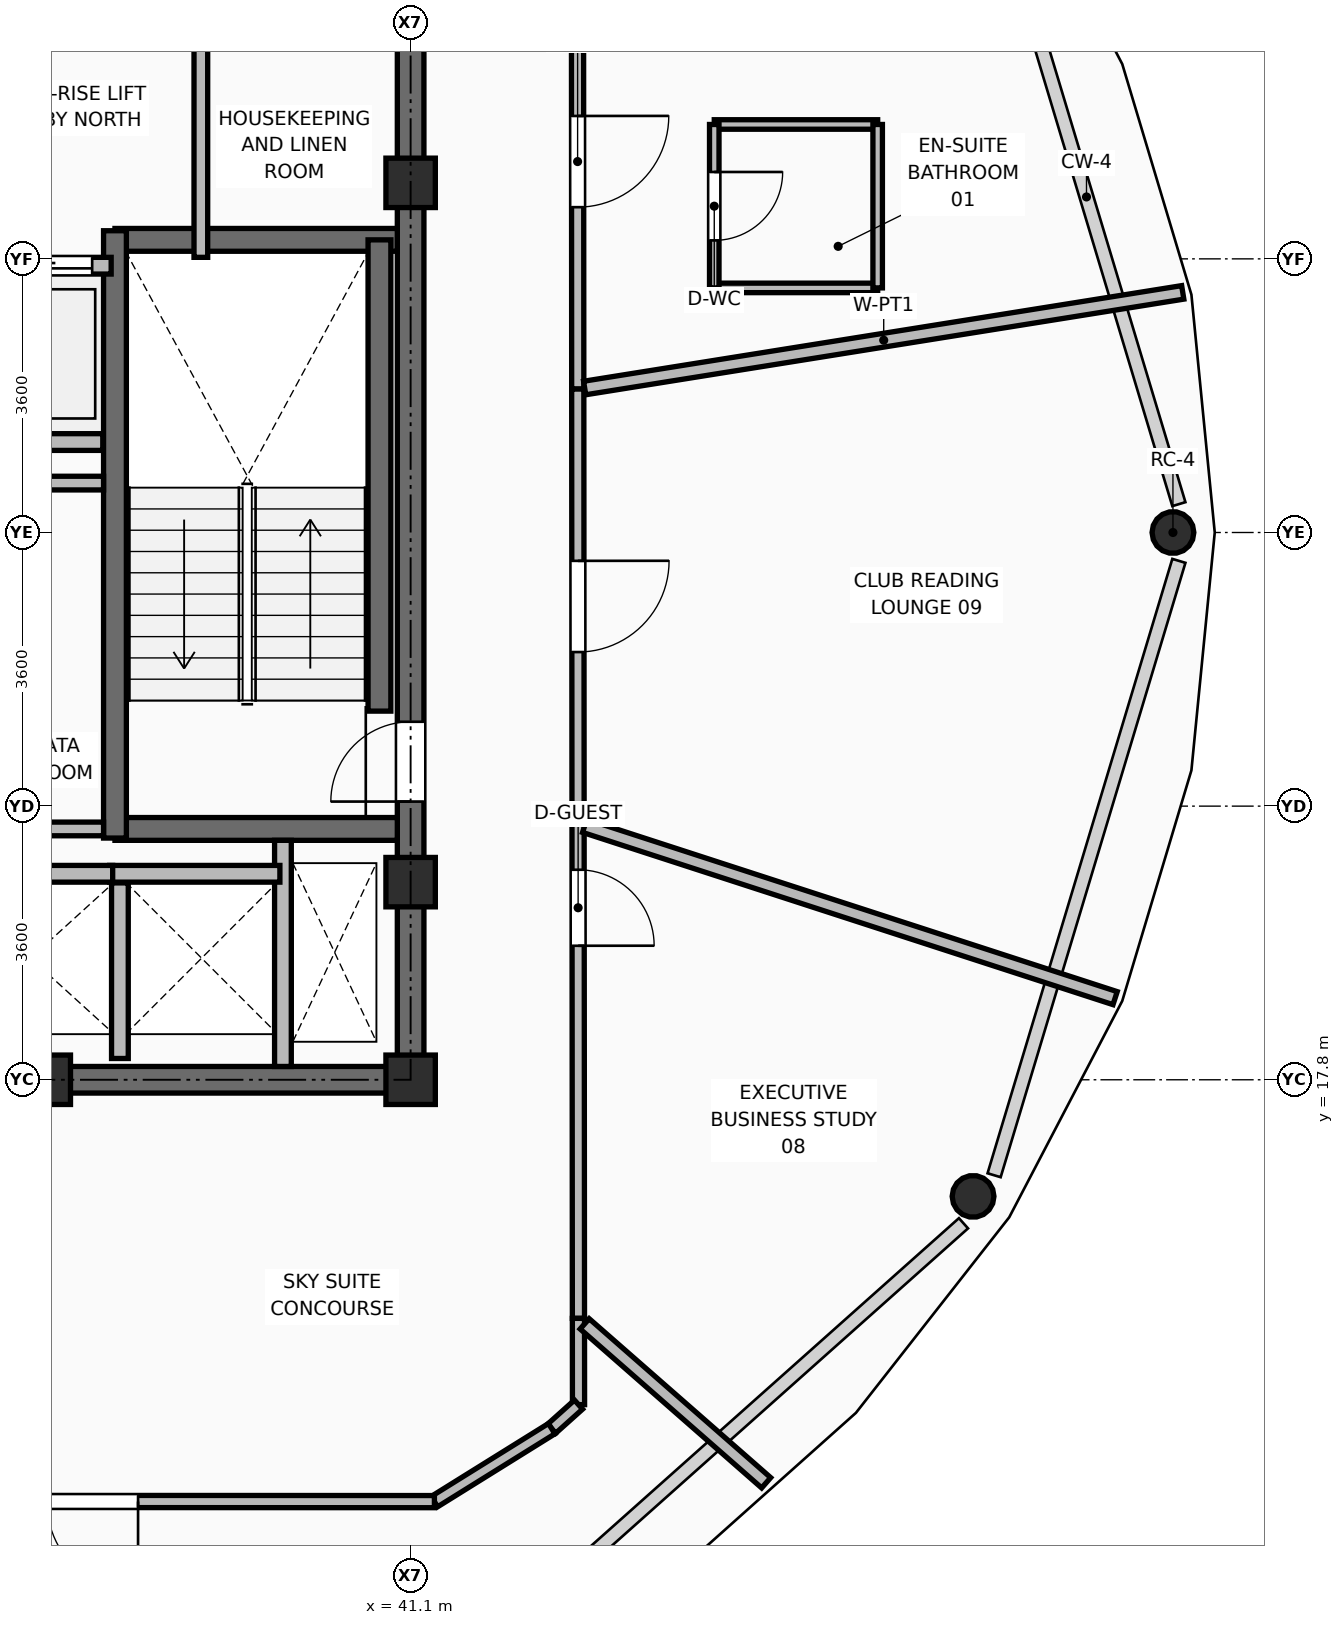
"""IFC4 building model, lengths in metres.
Left out: names, types, materials, properties, quantities, classifications, styles, units other than length and angle.
Written with IfcOpenShell. Run it as: python <this file> out.ifc"""

import sys

from ifc_helpers import new_model, si_unit, direction, frame, frame_2d, origin, origin_2d, place, context, subcontext, project, spatial, rectangle, hollow_circle, extrude, element, fill, save


model = new_model("IFC4")
c1 = context("Model", 3, precision=1e-05, world=origin(), true_north=direction((0.0, 1.0)))
c2 = subcontext(c1, "Body", "Model", "MODEL_VIEW")
j1 = project(units=[si_unit("LENGTHUNIT", "METRE"), si_unit("PLANEANGLEUNIT", "RADIAN")], contexts=[c1])
p1 = place(None, origin())
s1 = spatial("IfcSite", under=j1, at=p1, CompositionType="ELEMENT")
p2 = place(p1, origin())
s2 = spatial("IfcBuilding", under=s1, at=p2, CompositionType="ELEMENT")
p3 = place(p2, frame((0.0, 0.0, 275.1)))
s3 = spatial("IfcBuildingStorey", under=s2, at=p3, CompositionType="ELEMENT", Elevation=275.1)
for number, where, z_axis, x_axis in (
    (1, (36.3, 17.8, 0.0), (0.0, 0.0, 1.0), (1.0, 0.0, 0.0)),
    (2, (41.1, 17.8, 0.0), (0.0, 0.0, 1.0), (1.0, 0.0, 0.0)),
    (3, (41.1, 20.4, 0.0), (0.0, 0.0, 1.0), (1.0, 0.0, 0.0)),
    (4, (41.1, 29.6, 0.0), (0.0, 0.0, 1.0), (1.0, 0.0, 0.0)),
):
    element("IfcColumn", number, at=place(p3, frame(where, z_axis=z_axis, x_axis=x_axis)), inside=s3, PredefinedType="COLUMN", context=c2, shape_type="SweptSolid", body=[
        extrude(rectangle(XDim=0.65, YDim=0.65, at=origin_2d()), origin(), (0.0, 0.0, 1.0), 3.75),
    ])
p4 = place(p3, frame((51.13, 25.0, 0.0), z_axis=(-0.022357971521, 0.0, 0.999750029312), x_axis=(0.0, -1.0, 0.0)))
e5 = element("IfcColumn", 5, at=p4, inside=s3, PredefinedType="COLUMN", context=c2, shape_type="SweptSolid", body=[
    extrude(hollow_circle(Radius=0.275, WallThickness=0.025, at=origin_2d()), origin(), (0.0, 0.0, 1.0), 3.571),
])
p5 = place(p3, frame((48.5, 16.266, 0.0), z_axis=(-0.019349796045, 0.010050954129, 0.999762253595), x_axis=(-0.460957758055, -0.887422078432, 0.0)))
e6 = element("IfcColumn", 6, at=p5, inside=s3, PredefinedType="COLUMN", context=c2, shape_type="SweptSolid", body=[
    extrude(hollow_circle(Radius=0.275, WallThickness=0.025, at=origin_2d()), origin(), (0.0, 0.0, 1.0), 3.571),
])
p6 = place(p3, frame((37.275, 18.08, 0.0), z_axis=(0.0, 0.0, 1.0), x_axis=(0.0, 1.0, 0.0)))
e7 = element("IfcWall", 7, at=p6, inside=s3, PredefinedType="PARTITIONING", context=c2, shape_type="SweptSolid", body=[
    extrude(rectangle(XDim=2.31, YDim=0.22, at=frame_2d((1.155, 0.0))), origin(), (0.0, 0.0, 1.0), 3.545),
])
p7 = place(p3, frame((34.91, 26.19, 0.0), z_axis=(0.0, 0.0, 1.0), x_axis=(1.0, 0.0, 0.0)))
e8 = element("IfcWall", 8, at=p7, inside=s3, PredefinedType="PARTITIONING", context=c2, shape_type="SweptSolid", body=[
    extrude(rectangle(XDim=2.14, YDim=0.22, at=frame_2d((1.07, 0.0))), origin(), (0.0, 0.0, 1.0), 3.545),
])
p8 = place(p3, frame((34.95, 17.8, 0.0), z_axis=(0.0, 0.0, 1.0), x_axis=(1.0, 0.0, 0.0)))
e9 = element("IfcWall", 9, at=p8, inside=s3, PredefinedType="SHEAR", context=c2, shape_type="SweptSolid", body=[
    extrude(rectangle(XDim=6.325, YDim=0.35, at=frame_2d((3.163, 0.0))), origin(), (0.0, 0.0, 1.0), 3.57),
])
p9 = place(p3, frame((41.1, 17.975, 0.0), z_axis=(0.0, 0.0, 1.0), x_axis=(0.0, 1.0, 0.0)))
e10 = element("IfcWall", 10, at=p9, inside=s3, PredefinedType="SHEAR", context=c2, shape_type="SweptSolid", body=[
    extrude(rectangle(XDim=14.3, YDim=0.35, at=frame_2d((7.15, 0.0))), origin(), (0.0, 0.0, 1.0), 3.57),
])
p10 = place(p9, frame((3.485, 0.0, 0.0)))
e11 = element("IfcOpeningElement", 11, at=p10, cuts=e10, PredefinedType="OPENING", context=c2, shape_type="SweptSolid", body=[
    extrude(rectangle(XDim=1.05, YDim=2.1, at=frame_2d((0.525, 1.05))), frame((0.0, 0.185, 0.0), z_axis=(0.0, -1.0, 0.0), x_axis=(1.0, 0.0, 0.0)), (0.0, 0.0, 1.0), 0.37),
])
for number, where, z_axis, x_axis in (
    (12, (37.21, 21.1, 0.0), (0.0, 0.0, 1.0), (1.0, 0.0, 0.0)),
    (13, (37.21, 28.85, 0.0), (0.0, 0.0, 1.0), (1.0, 0.0, 0.0)),
):
    element("IfcWall", number, at=place(p3, frame(where, z_axis=z_axis, x_axis=x_axis)), inside=s3, PredefinedType="SHEAR", context=c2, shape_type="SweptSolid", body=[
        extrude(rectangle(XDim=3.715, YDim=0.3, at=frame_2d((1.857, 0.0))), origin(), (0.0, 0.0, 1.0), 3.57),
    ])
p11 = place(p3, frame((37.21, 20.98, 0.0), z_axis=(0.0, 0.0, 1.0), x_axis=(0.0, 1.0, 0.0)))
e14 = element("IfcWall", 14, at=p11, inside=s3, PredefinedType="SHEAR", context=c2, shape_type="SweptSolid", body=[
    extrude(rectangle(XDim=7.99, YDim=0.3, at=frame_2d((3.995, 0.0))), origin(), (0.0, 0.0, 1.0), 3.57),
])
p12 = place(p3, frame((40.69, 22.65, 0.0), z_axis=(0.0, 0.0, 1.0), x_axis=(0.0, 1.0, 0.0)))
e15 = element("IfcWall", 15, at=p12, inside=s3, PredefinedType="SHEAR", context=c2, shape_type="SweptSolid", body=[
    extrude(rectangle(XDim=6.2, YDim=0.3, at=frame_2d((3.1, 0.0))), origin(), (0.0, 0.0, 1.0), 3.57),
])
p13 = place(p3, frame((39.42, 17.975, 0.0), z_axis=(0.0, 0.0, 1.0), x_axis=(0.0, 1.0, 0.0)))
e16 = element("IfcWall", 16, at=p13, inside=s3, PredefinedType="PARTITIONING", context=c2, shape_type="SweptSolid", body=[
    extrude(rectangle(XDim=2.975, YDim=0.22, at=frame_2d((1.487, 0.0))), origin(), (0.0, 0.0, 1.0), 3.132),
])
for number, where, z_axis, x_axis in (
    (17, (37.14, 20.51, 0.0), (0.0, 0.0, 1.0), (1.0, 0.0, 0.0)),
    (18, (34.94, 20.51, 0.0), (0.0, 0.0, 1.0), (1.0, 0.0, 0.0)),
):
    element("IfcWall", number, at=place(p3, frame(where, z_axis=z_axis, x_axis=x_axis)), inside=s3, PredefinedType="PARTITIONING", context=c2, shape_type="SweptSolid", body=[
        extrude(rectangle(XDim=2.24, YDim=0.22, at=frame_2d((1.12, 0.0))), origin(), (0.0, 0.0, 1.0), 3.55),
    ])
p14 = place(p3, frame((35.56, 28.51, 0.0), z_axis=(0.0, 0.0, 1.0), x_axis=(1.0, 0.0, 0.0)))
e19 = element("IfcWall", 19, at=p14, inside=s3, PredefinedType="PARTITIONING", context=c2, shape_type="SweptSolid", body=[
    extrude(rectangle(XDim=1.6, YDim=0.22, at=frame_2d((0.8, 0.0))), origin(), (0.0, 0.0, 1.0), 3.55),
])
p15 = place(p14, frame((0.25, 0.0, 0.0)))
e20 = element("IfcOpeningElement", 20, at=p15, cuts=e19, PredefinedType="OPENING", context=c2, shape_type="SweptSolid", body=[
    extrude(rectangle(XDim=1.1, YDim=2.2, at=frame_2d((0.55, 1.1))), frame((0.0, 0.12, 0.0), z_axis=(0.0, -1.0, 0.0), x_axis=(1.0, 0.0, 0.0)), (0.0, 0.0, 1.0), 0.24),
])
p16 = place(p3, frame((34.98, 21.1, 0.0), z_axis=(0.0, 0.0, 1.0), x_axis=(1.0, 0.0, 0.0)))
e21 = element("IfcWall", 21, at=p16, inside=s3, PredefinedType="PARTITIONING", context=c2, shape_type="SweptSolid", body=[
    extrude(rectangle(XDim=2.08, YDim=0.18, at=frame_2d((1.04, 0.0))), origin(), (0.0, 0.0, 1.0), 3.55),
])
p17 = place(p3, frame((34.72, 25.65, 0.0), z_axis=(0.0, 0.0, 1.0), x_axis=(1.0, 0.0, 0.0)))
e22 = element("IfcWall", 22, at=p17, inside=s3, PredefinedType="PARTITIONING", context=c2, shape_type="SweptSolid", body=[
    extrude(rectangle(XDim=2.34, YDim=0.18, at=frame_2d((1.17, 0.0))), origin(), (0.0, 0.0, 1.0), 3.55),
])
p18 = place(p3, frame((38.34, 28.62, 0.0), z_axis=(0.0, 0.0, 1.0), x_axis=(0.0, 1.0, 0.0)))
e23 = element("IfcWall", 23, at=p18, inside=s3, PredefinedType="PARTITIONING", context=c2, shape_type="SweptSolid", body=[
    extrude(rectangle(XDim=3.655, YDim=0.18, at=frame_2d((1.827, 0.0))), origin(), (0.0, 0.0, 1.0), 3.132),
])
p19 = place(p3, frame((43.294, 34.66, 0.0), z_axis=(0.0, 0.0, 1.0), x_axis=(0.000659589027, -0.999999782471, 0.0)))
e24 = element("IfcWall", 24, at=p19, inside=s3, PredefinedType="PARTITIONING", context=c2, shape_type="SweptSolid", body=[
    extrude(rectangle(XDim=7.773, YDim=0.16, at=frame_2d((3.886, 0.0))), origin(), (0.0, 0.0, 1.0), 3.132),
])
p20 = place(p19, frame((4.18, 0.0, 0.0)))
e25 = element("IfcOpeningElement", 25, at=p20, cuts=e24, PredefinedType="OPENING", context=c2, shape_type="SweptSolid", body=[
    extrude(rectangle(XDim=1.2, YDim=2.1, at=frame_2d((0.6, 1.05))), frame((0.0, 0.09, 0.0), z_axis=(0.0, -1.0, 0.0), x_axis=(1.0, 0.0, 0.0)), (0.0, 0.0, 1.0), 0.18),
])
p21 = place(p3, frame((43.299, 26.887, 0.0), z_axis=(0.0, 0.0, 1.0), x_axis=(0.000683030791, -0.999999766734, 0.0)))
e26 = element("IfcWall", 26, at=p21, inside=s3, PredefinedType="PARTITIONING", context=c2, shape_type="SweptSolid", body=[
    extrude(rectangle(XDim=5.719, YDim=0.16, at=frame_2d((2.859, 0.0))), origin(), (0.0, 0.0, 1.0), 3.132),
])
p22 = place(p21, frame((2.26, 0.0, 0.0)))
e27 = element("IfcOpeningElement", 27, at=p22, cuts=e26, PredefinedType="OPENING", context=c2, shape_type="SweptSolid", body=[
    extrude(rectangle(XDim=1.2, YDim=2.1, at=frame_2d((0.6, 1.05))), frame((0.0, 0.09, 0.0), z_axis=(0.0, -1.0, 0.0), x_axis=(1.0, 0.0, 0.0)), (0.0, 0.0, 1.0), 0.18),
])
p23 = place(p3, frame((43.303, 21.168, 0.0), z_axis=(0.0, 0.0, 1.0), x_axis=(0.000787903556, -0.999999689604, 0.0)))
e28 = element("IfcWall", 28, at=p23, inside=s3, PredefinedType="PARTITIONING", context=c2, shape_type="SweptSolid", body=[
    extrude(rectangle(XDim=6.507, YDim=0.16, at=frame_2d((3.253, 0.0))), origin(), (0.0, 0.0, 1.0), 3.132),
])
p24 = place(p23, frame((0.605, 0.0, 0.0)))
e29 = element("IfcOpeningElement", 29, at=p24, cuts=e28, PredefinedType="OPENING", context=c2, shape_type="SweptSolid", body=[
    extrude(rectangle(XDim=1.0, YDim=2.1, at=frame_2d((0.5, 1.05))), frame((0.0, 0.09, 0.0), z_axis=(0.0, -1.0, 0.0), x_axis=(1.0, 0.0, 0.0)), (0.0, 0.0, 1.0), 0.18),
])
p25 = place(p3, frame((43.308, 14.661, 0.0), z_axis=(0.0, 0.0, 1.0), x_axis=(0.000860399768, -0.999999629856, 0.0)))
e30 = element("IfcWall", 30, at=p25, inside=s3, PredefinedType="PARTITIONING", context=c2, shape_type="SweptSolid", body=[
    extrude(rectangle(XDim=1.135, YDim=0.16, at=frame_2d((0.567, 0.0))), origin(), (0.0, 0.0, 1.0), 3.55),
])
p26 = place(p3, frame((43.309, 13.526, 0.0), z_axis=(0.0, 0.0, 1.0), x_axis=(-0.74518739818, -0.666855112894, 0.0)))
e31 = element("IfcWall", 31, at=p26, inside=s3, PredefinedType="PARTITIONING", context=c2, shape_type="SweptSolid", body=[
    extrude(rectangle(XDim=0.474, YDim=0.16, at=frame_2d((0.237, 0.0))), origin(), (0.0, 0.0, 1.0), 3.55),
])
p27 = place(p3, frame((42.956, 13.21, 0.0), z_axis=(0.0, 0.0, 1.0), x_axis=(-0.84908338632, -0.528258840982, 0.0)))
e32 = element("IfcWall", 32, at=p27, inside=s3, PredefinedType="PARTITIONING", context=c2, shape_type="SweptSolid", body=[
    extrude(rectangle(XDim=1.817, YDim=0.16, at=frame_2d((0.909, 0.0))), origin(), (0.0, 0.0, 1.0), 3.132),
])
p28 = place(p3, frame((41.413, 12.25, 0.0), z_axis=(0.0, 0.0, 1.0), x_axis=(-0.999999941203, 0.000342920808, 0.0)))
e33 = element("IfcWall", 33, at=p28, inside=s3, PredefinedType="PARTITIONING", context=c2, shape_type="SweptSolid", body=[
    extrude(rectangle(XDim=11.391, YDim=0.16, at=frame_2d((5.696, 0.0))), origin(), (0.0, 0.0, 1.0), 3.132),
])
p29 = place(p28, frame((3.899, 0.0, 0.0)))
e34 = element("IfcOpeningElement", 34, at=p29, cuts=e33, PredefinedType="OPENING", context=c2, shape_type="SweptSolid", body=[
    extrude(rectangle(XDim=1.2, YDim=2.1, at=frame_2d((0.6, 1.05))), frame((0.0, 0.09, 0.0), z_axis=(0.0, -1.0, 0.0), x_axis=(1.0, 0.0, 0.0)), (0.0, 0.0, 1.0), 0.18),
])
p30 = place(p3, frame((43.39, 26.901, 0.0), z_axis=(0.0, 0.0, 1.0), x_axis=(0.98746031542, 0.15786743005, 0.0)))
e35 = element("IfcWall", 35, at=p30, inside=s3, PredefinedType="PARTITIONING", context=c2, shape_type="SweptSolid", body=[
    extrude(rectangle(XDim=7.969, YDim=0.18, at=frame_2d((3.984, 0.0))), origin(), (0.0, 0.0, 1.0), 3.003),
])
p31 = place(p3, frame((43.39, 14.589, 0.0), z_axis=(0.0, 0.0, 1.0), x_axis=(0.752357486603, -0.658755047307, 0.0)))
e36 = element("IfcWall", 36, at=p31, inside=s3, PredefinedType="PARTITIONING", context=c2, shape_type="SweptSolid", body=[
    extrude(rectangle(XDim=3.174, YDim=0.18, at=frame_2d((1.587, 0.0))), origin(), (0.0, 0.0, 1.0), 3.003),
])
p32 = place(p3, frame((43.39, 21.14, 0.0), z_axis=(0.0, 0.0, 1.0), x_axis=(0.951126451792, -0.308801672115, 0.0)))
e37 = element("IfcWall", 37, at=p32, inside=s3, PredefinedType="PARTITIONING", context=c2, shape_type="SweptSolid", body=[
    extrude(rectangle(XDim=7.338, YDim=0.18, at=frame_2d((3.669, 0.0))), origin(), (0.0, 0.0, 1.0), 3.003),
])
for number, where, z_axis, x_axis in (
    (38, (45.095, 28.218, 0.0), (0.0, 0.0, 1.0), (1.0, 0.0, 0.0)),
    (39, (45.095, 30.368, 0.0), (0.0, 0.0, 1.0), (1.0, 0.0, 0.0)),
):
    element("IfcWall", number, at=place(p3, frame(where, z_axis=z_axis, x_axis=x_axis)), inside=s3, PredefinedType="PARTITIONING", context=c2, shape_type="SweptSolid", body=[
        extrude(rectangle(XDim=2.15, YDim=0.125, at=frame_2d((1.075, 0.0))), origin(), (0.0, 0.0, 1.0), 3.55),
    ])
p33 = place(p3, frame((45.095, 28.218, 0.0), z_axis=(0.0, 0.0, 1.0), x_axis=(0.0, 1.0, 0.0)))
e40 = element("IfcWall", 40, at=p33, inside=s3, PredefinedType="PARTITIONING", context=c2, shape_type="SweptSolid", body=[
    extrude(rectangle(XDim=2.15, YDim=0.125, at=frame_2d((1.075, 0.0))), origin(), (0.0, 0.0, 1.0), 3.55),
])
p34 = place(p33, frame((0.625, 0.0, 0.0)))
e41 = element("IfcOpeningElement", 41, at=p34, cuts=e40, PredefinedType="OPENING", context=c2, shape_type="SweptSolid", body=[
    extrude(rectangle(XDim=0.9, YDim=2.1, at=frame_2d((0.45, 1.05))), frame((0.0, 0.073, 0.0), z_axis=(0.0, -1.0, 0.0), x_axis=(1.0, 0.0, 0.0)), (0.0, 0.0, 1.0), 0.145),
])
p35 = place(p3, frame((47.245, 28.218, 0.0), z_axis=(0.0, 0.0, 1.0), x_axis=(0.0, 1.0, 0.0)))
e42 = element("IfcWall", 42, at=p35, inside=s3, PredefinedType="PARTITIONING", context=c2, shape_type="SweptSolid", body=[
    extrude(rectangle(XDim=2.15, YDim=0.125, at=frame_2d((1.075, 0.0))), origin(), (0.0, 0.0, 1.0), 3.55),
])
p36 = place(p10, origin())
e43 = element("IfcDoor", 43, at=p36, inside=s3, OperationType="SINGLE_SWING_LEFT", PredefinedType="DOOR", context=c2, shape_type="SweptSolid", body=[
    extrude(rectangle(XDim=1.05, YDim=2.1, at=frame_2d((0.525, 1.05))), frame((0.0, 0.025, 0.0), z_axis=(0.0, -1.0, 0.0), x_axis=(1.0, 0.0, 0.0)), (0.0, 0.0, 1.0), 0.05),
])
fill(e11, e43)
p37 = place(p15, origin())
e44 = element("IfcDoor", 44, at=p37, inside=s3, OperationType="DOUBLE_DOOR_SLIDING", PredefinedType="DOOR", context=c2, shape_type="SweptSolid", body=[
    extrude(rectangle(XDim=1.1, YDim=2.2, at=frame_2d((0.55, 1.1))), frame((0.0, 0.025, 0.0), z_axis=(0.0, -1.0, 0.0), x_axis=(1.0, 0.0, 0.0)), (0.0, 0.0, 1.0), 0.05),
])
fill(e20, e44)
p38 = place(p34, frame((0.9, 0.0, 0.0), z_axis=(0.0, 0.0, 1.0), x_axis=(-1.0, 0.0, 0.0)))
e45 = element("IfcDoor", 45, at=p38, inside=s3, OperationType="SINGLE_SWING_LEFT", PredefinedType="DOOR", context=c2, shape_type="SweptSolid", body=[
    extrude(rectangle(XDim=0.9, YDim=2.1, at=frame_2d((0.45, 1.05))), frame((0.0, 0.025, 0.0), z_axis=(0.0, -1.0, 0.0), x_axis=(1.0, 0.0, 0.0)), (0.0, 0.0, 1.0), 0.05),
])
fill(e41, e45)
p39 = place(p20, origin())
e46 = element("IfcDoor", 46, at=p39, inside=s3, OperationType="SINGLE_SWING_LEFT", PredefinedType="DOOR", context=c2, shape_type="SweptSolid", body=[
    extrude(rectangle(XDim=1.2, YDim=2.1, at=frame_2d((0.6, 1.05))), frame((0.0, 0.025, 0.0), z_axis=(0.0, -1.0, 0.0), x_axis=(1.0, 0.0, 0.0)), (0.0, 0.0, 1.0), 0.05),
])
fill(e25, e46)
p40 = place(p29, origin())
e47 = element("IfcDoor", 47, at=p40, inside=s3, OperationType="SINGLE_SWING_LEFT", PredefinedType="DOOR", context=c2, shape_type="SweptSolid", body=[
    extrude(rectangle(XDim=1.2, YDim=2.1, at=frame_2d((0.6, 1.05))), frame((0.0, 0.025, 0.0), z_axis=(0.0, -1.0, 0.0), x_axis=(1.0, 0.0, 0.0)), (0.0, 0.0, 1.0), 0.05),
])
fill(e34, e47)
p41 = place(p24, origin())
e48 = element("IfcDoor", 48, at=p41, inside=s3, OperationType="SINGLE_SWING_RIGHT", PredefinedType="DOOR", context=c2, shape_type="SweptSolid", body=[
    extrude(rectangle(XDim=1.0, YDim=2.1, at=frame_2d((0.5, 1.05))), frame((0.0, 0.025, 0.0), z_axis=(0.0, -1.0, 0.0), x_axis=(1.0, 0.0, 0.0)), (0.0, 0.0, 1.0), 0.05),
])
fill(e29, e48)
p42 = place(p22, origin())
e49 = element("IfcDoor", 49, at=p42, inside=s3, OperationType="SINGLE_SWING_LEFT", PredefinedType="DOOR", context=c2, shape_type="SweptSolid", body=[
    extrude(rectangle(XDim=1.2, YDim=2.1, at=frame_2d((0.6, 1.05))), frame((0.0, 0.025, 0.0), z_axis=(0.0, -1.0, 0.0), x_axis=(1.0, 0.0, 0.0)), (0.0, 0.0, 1.0), 0.05),
])
fill(e27, e49)
save(model, sys.argv[1])
